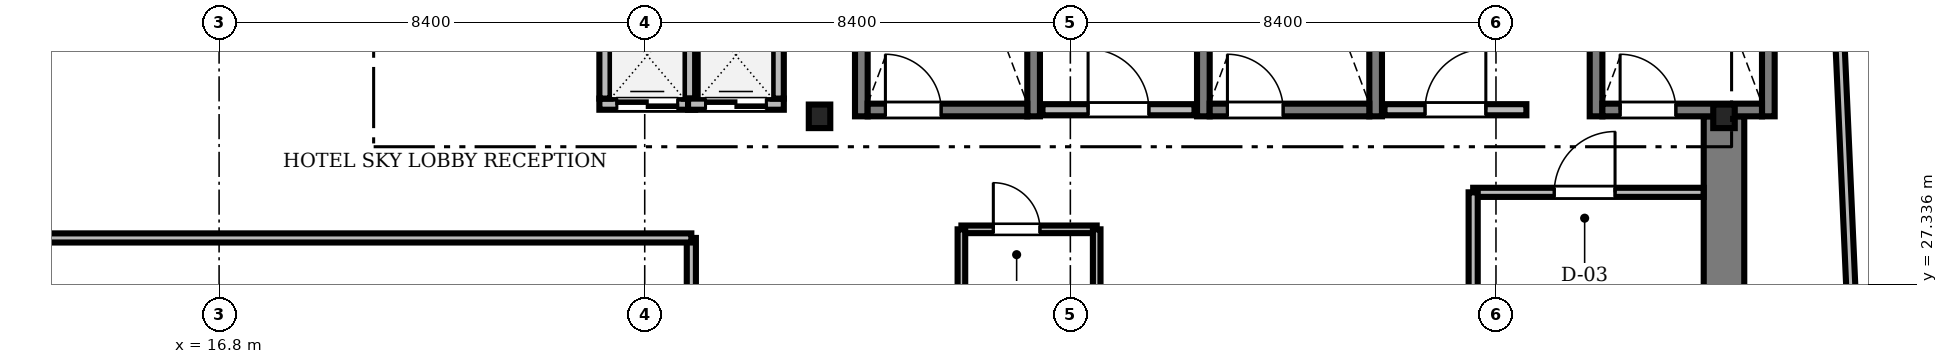
"""IFC4 building model, lengths in metres.
Left out: names, types, materials, properties, quantities, classifications, styles, units other than length and angle.
Written with IfcOpenShell. Run it as: python <this file> out.ifc"""

import sys

from ifc_helpers import new_model, si_unit, direction, frame, frame_2d, origin, origin_2d, place, context, subcontext, project, spatial, rectangle, i_section, extrude, source, transform, mapped, element, fill, save


model = new_model("IFC4")
c1 = context("Model", 3, precision=1e-05, world=origin(), true_north=direction((0.0, 1.0)))
c2 = subcontext(c1, "Body", "Model", "MODEL_VIEW")
j1 = project(units=[si_unit("LENGTHUNIT", "METRE"), si_unit("PLANEANGLEUNIT", "RADIAN")], contexts=[c1])
p1 = place(None, origin())
s1 = spatial("IfcSite", under=j1, at=p1, CompositionType="ELEMENT")
p2 = place(p1, origin())
s2 = spatial("IfcBuilding", under=s1, at=p2, CompositionType="ELEMENT")
p3 = place(p2, frame((0.0, 0.0, 98.7)))
s3 = spatial("IfcBuildingStorey", under=s2, at=p3, CompositionType="ELEMENT", Elevation=98.7)
m1 = source(origin(), c2, "Body", "SweptSolid", [
    extrude(rectangle(XDim=13.15, YDim=0.8, at=frame_2d((6.575, 0.0))), origin(), (0.0, 0.0, 1.0), 4.76),
])
p4 = place(p3, frame((46.5, 17.5, 0.0), z_axis=(0.0, 0.0, 1.0), x_axis=(0.0, 1.0, 0.0)))
e1 = element("IfcWall", 1, at=p4, inside=s3, PredefinedType="SHEAR", context=c2, shape_type="MappedRepresentation", body=[
    mapped(m1, transform((0.0, 0.0, 0.0), scale=1.0)),
])
m2 = source(origin(), c2, "Body", "SweptSolid", [
    extrude(i_section(OverallWidth=0.424, OverallDepth=0.465, WebThickness=0.035, FlangeThickness=0.056, FilletRadius=0.015, at=origin_2d()), origin(), (0.0, 0.0, 1.0), 4.76),
])
for number, where, z_axis, x_axis in (
    (2, (28.65, 30.65, 0.0), (0.0, 0.0, 1.0), (1.0, 0.0, 0.0)),
    (3, (46.5, 30.65, 0.0), (0.0, 0.0, 1.0), (1.0, 0.0, 0.0)),
):
    element("IfcColumn", number, at=place(p3, frame(where, z_axis=z_axis, x_axis=x_axis)), inside=s3, PredefinedType="COLUMN", context=c2, shape_type="MappedRepresentation", body=[
        mapped(m2, transform((0.0, 0.0, 0.0), scale=1.0)),
    ])
m3 = source(origin(), c2, "Body", "SweptSolid", [
    extrude(rectangle(XDim=9.25, YDim=0.25, at=frame_2d((4.625, 0.0))), origin(), (0.0, 0.0, 1.0), 4.8),
])
for number, where, z_axis, x_axis in (
    (4, (29.475, 30.65, 0.0), (0.0, 0.0, 1.0), (0.0, 1.0, 0.0)),
    (5, (32.875, 30.65, 0.0), (0.0, 0.0, 1.0), (0.0, 1.0, 0.0)),
):
    element("IfcWall", number, at=place(p3, frame(where, z_axis=z_axis, x_axis=x_axis)), inside=s3, PredefinedType="SOLIDWALL", context=c2, shape_type="MappedRepresentation", body=[
        mapped(m3, transform((0.0, 0.0, 0.0), scale=1.0)),
    ])
m4 = source(origin(), c2, "Body", "SweptSolid", [
    extrude(rectangle(XDim=3.15, YDim=0.25, at=frame_2d((1.575, 0.0))), origin(), (0.0, 0.0, 1.0), 4.8),
])
p5 = place(p3, frame((29.6, 30.775, 0.0), z_axis=(0.0, 0.0, 1.0), x_axis=(1.0, 0.0, 0.0)))
e6 = element("IfcWall", 6, at=p5, inside=s3, PredefinedType="SOLIDWALL", context=c2, shape_type="MappedRepresentation", body=[
    mapped(m4, transform((0.0, 0.0, 0.0), scale=1.0)),
])
m5 = source(origin(), c2, "Body", "SweptSolid", [
    extrude(rectangle(XDim=1.1, YDim=2.2, at=frame_2d((0.55, 1.1))), frame((0.0, 0.135, 0.0), z_axis=(0.0, -1.0, 0.0), x_axis=(1.0, 0.0, 0.0)), (0.0, 0.0, 1.0), 0.27),
])
p6 = place(p5, frame((0.35, 0.0, 0.0)))
e7 = element("IfcOpeningElement", 7, at=p6, cuts=e6, PredefinedType="OPENING", context=c2, shape_type="MappedRepresentation", body=[
    mapped(m5, transform((0.0, 0.0, 0.0), scale=1.0)),
])
for number, where, z_axis, x_axis in (
    (8, (36.225, 30.65, 0.0), (0.0, 0.0, 1.0), (0.0, 1.0, 0.0)),
    (9, (39.625, 30.65, 0.0), (0.0, 0.0, 1.0), (0.0, 1.0, 0.0)),
):
    element("IfcWall", number, at=place(p3, frame(where, z_axis=z_axis, x_axis=x_axis)), inside=s3, PredefinedType="SOLIDWALL", context=c2, shape_type="MappedRepresentation", body=[
        mapped(m3, transform((0.0, 0.0, 0.0), scale=1.0)),
    ])
p7 = place(p3, frame((36.35, 30.775, 0.0), z_axis=(0.0, 0.0, 1.0), x_axis=(1.0, 0.0, 0.0)))
e10 = element("IfcWall", 10, at=p7, inside=s3, PredefinedType="SOLIDWALL", context=c2, shape_type="MappedRepresentation", body=[
    mapped(m4, transform((0.0, 0.0, 0.0), scale=1.0)),
])
p8 = place(p7, frame((0.35, 0.0, 0.0)))
e11 = element("IfcOpeningElement", 11, at=p8, cuts=e10, PredefinedType="OPENING", context=c2, shape_type="MappedRepresentation", body=[
    mapped(m5, transform((0.0, 0.0, 0.0), scale=1.0)),
])
for number, where, z_axis, x_axis in (
    (12, (43.975, 30.65, 0.0), (0.0, 0.0, 1.0), (0.0, 1.0, 0.0)),
    (13, (47.375, 30.65, 0.0), (0.0, 0.0, 1.0), (0.0, 1.0, 0.0)),
):
    element("IfcWall", number, at=place(p3, frame(where, z_axis=z_axis, x_axis=x_axis)), inside=s3, PredefinedType="SOLIDWALL", context=c2, shape_type="MappedRepresentation", body=[
        mapped(m3, transform((0.0, 0.0, 0.0), scale=1.0)),
    ])
p9 = place(p3, frame((44.1, 30.775, 0.0), z_axis=(0.0, 0.0, 1.0), x_axis=(1.0, 0.0, 0.0)))
e14 = element("IfcWall", 14, at=p9, inside=s3, PredefinedType="SOLIDWALL", context=c2, shape_type="MappedRepresentation", body=[
    mapped(m4, transform((0.0, 0.0, 0.0), scale=1.0)),
])
p10 = place(p9, frame((0.35, 0.0, 0.0)))
e15 = element("IfcOpeningElement", 15, at=p10, cuts=e14, PredefinedType="OPENING", context=c2, shape_type="MappedRepresentation", body=[
    mapped(m5, transform((0.0, 0.0, 0.0), scale=1.0)),
])
m6 = source(origin(), c2, "Body", "SweptSolid", [
    extrude(rectangle(XDim=3.0, YDim=0.22, at=frame_2d((1.5, 0.0))), origin(), (0.0, 0.0, 1.0), 4.76),
])
p11 = place(p3, frame((33.05, 30.78, 0.0), z_axis=(0.0, 0.0, 1.0), x_axis=(1.0, 0.0, 0.0)))
e16 = element("IfcWall", 16, at=p11, inside=s3, PredefinedType="SOLIDWALL", context=c2, shape_type="MappedRepresentation", body=[
    mapped(m6, transform((0.0, 0.0, 0.0), scale=1.0)),
])
m7 = source(origin(), c2, "Body", "SweptSolid", [
    extrude(rectangle(XDim=1.2, YDim=2.2, at=frame_2d((0.6, 1.1))), frame((0.0, 0.12, 0.0), z_axis=(0.0, -1.0, 0.0), x_axis=(1.0, 0.0, 0.0)), (0.0, 0.0, 1.0), 0.24),
])
p12 = place(p11, frame((0.9, 0.0, 0.0)))
e17 = element("IfcOpeningElement", 17, at=p12, cuts=e16, PredefinedType="OPENING", context=c2, shape_type="MappedRepresentation", body=[
    mapped(m7, transform((0.0, 0.0, 0.0), scale=1.0)),
])
m8 = source(origin(), c2, "Body", "SweptSolid", [
    extrude(rectangle(XDim=2.8, YDim=0.22, at=frame_2d((1.4, 0.0))), origin(), (0.0, 0.0, 1.0), 4.76),
])
p13 = place(p3, frame((39.8, 30.78, 0.0), z_axis=(0.0, 0.0, 1.0), x_axis=(1.0, 0.0, 0.0)))
e18 = element("IfcWall", 18, at=p13, inside=s3, PredefinedType="SOLIDWALL", context=c2, shape_type="MappedRepresentation", body=[
    mapped(m8, transform((0.0, 0.0, 0.0), scale=1.0)),
])
p14 = place(p13, frame((0.8, 0.0, 0.0)))
e19 = element("IfcOpeningElement", 19, at=p14, cuts=e18, PredefinedType="OPENING", context=c2, shape_type="MappedRepresentation", body=[
    mapped(m7, transform((0.0, 0.0, 0.0), scale=1.0)),
])
m9 = source(origin(), c2, "Body", "SweptSolid", [
    extrude(rectangle(XDim=1.89, YDim=0.22, at=frame_2d((0.945, 0.0))), origin(), (0.0, 0.0, 1.0), 4.76),
])
p15 = place(p3, frame((24.305, 30.89, 0.0), z_axis=(0.0, 0.0, 1.0), x_axis=(1.0, 0.0, 0.0)))
e20 = element("IfcWall", 20, at=p15, inside=s3, PredefinedType="SOLIDWALL", context=c2, shape_type="MappedRepresentation", body=[
    mapped(m9, transform((0.0, 0.0, 0.0), scale=1.0)),
])
m10 = source(origin(), c2, "Body", "SweptSolid", [
    extrude(rectangle(XDim=1.2, YDim=2.25, at=frame_2d((0.6, 1.125))), frame((0.0, 0.12, 0.0), z_axis=(0.0, -1.0, 0.0), x_axis=(1.0, 0.0, 0.0)), (0.0, 0.0, 1.0), 0.24),
])
p16 = place(p15, frame((0.345, 0.0, 0.0)))
e21 = element("IfcOpeningElement", 21, at=p16, cuts=e20, PredefinedType="OPENING", context=c2, shape_type="MappedRepresentation", body=[
    mapped(m10, transform((0.0, 0.0, 0.0), scale=1.0)),
])
m11 = source(origin(), c2, "Body", "SweptSolid", [
    extrude(rectangle(XDim=1.7, YDim=0.22, at=frame_2d((0.85, 0.0))), origin(), (0.0, 0.0, 1.0), 4.76),
])
for number, where, z_axis, x_axis in (
    (22, (24.415, 31.0, 0.0), (0.0, 0.0, 1.0), (0.0, 1.0, 0.0)),
    (23, (26.085, 31.0, 0.0), (0.0, 0.0, 1.0), (0.0, 1.0, 0.0)),
):
    element("IfcWall", number, at=place(p3, frame(where, z_axis=z_axis, x_axis=x_axis)), inside=s3, PredefinedType="SOLIDWALL", context=c2, shape_type="MappedRepresentation", body=[
        mapped(m11, transform((0.0, 0.0, 0.0), scale=1.0)),
    ])
p17 = place(p3, frame((26.055, 30.89, 0.0), z_axis=(0.0, 0.0, 1.0), x_axis=(1.0, 0.0, 0.0)))
e24 = element("IfcWall", 24, at=p17, inside=s3, PredefinedType="SOLIDWALL", context=c2, shape_type="MappedRepresentation", body=[
    mapped(m9, transform((0.0, 0.0, 0.0), scale=1.0)),
])
p18 = place(p17, frame((0.345, 0.0, 0.0)))
e25 = element("IfcOpeningElement", 25, at=p18, cuts=e24, PredefinedType="OPENING", context=c2, shape_type="MappedRepresentation", body=[
    mapped(m10, transform((0.0, 0.0, 0.0), scale=1.0)),
])
p19 = place(p3, frame((27.835, 31.0, 0.0), z_axis=(0.0, 0.0, 1.0), x_axis=(0.0, 1.0, 0.0)))
e26 = element("IfcWall", 26, at=p19, inside=s3, PredefinedType="SOLIDWALL", context=c2, shape_type="MappedRepresentation", body=[
    mapped(m11, transform((0.0, 0.0, 0.0), scale=1.0)),
])
m12 = source(origin(), c2, "Body", "SweptSolid", [
    extrude(rectangle(XDim=27.106, YDim=0.18, at=frame_2d((13.553, 0.0))), origin(), (0.0, 0.0, 1.0), 4.152),
])
p20 = place(p3, frame((49.6, 13.8, 0.0), z_axis=(0.0, 0.0, 1.0), x_axis=(-0.044277164483, 0.999019285452, 0.0)))
e27 = element("IfcWall", 27, at=p20, inside=s3, PredefinedType="PARTITIONING", context=c2, shape_type="MappedRepresentation", body=[
    mapped(m12, transform((0.0, 0.0, 0.0), scale=1.0)),
])
m13 = source(origin(), c2, "Body", "SweptSolid", [
    extrude(rectangle(XDim=1.8, YDim=2.4, at=frame_2d((0.9, 1.2))), frame((0.0, 0.1, 0.0), z_axis=(0.0, -1.0, 0.0), x_axis=(1.0, 0.0, 0.0)), (0.0, 0.0, 1.0), 0.2),
])
p21 = place(p20, frame((2.4, 0.0, 0.0)))
e28 = element("IfcOpeningElement", 28, at=p21, cuts=e27, PredefinedType="OPENING", context=c2, shape_type="MappedRepresentation", body=[
    mapped(m13, transform((0.0, 0.0, 0.0), scale=1.0)),
])
m14 = source(origin(), c2, "Body", "SweptSolid", [
    extrude(rectangle(XDim=1.05, YDim=2.2, at=frame_2d((0.525, 1.1))), frame((0.0, 0.1, 0.0), z_axis=(0.0, -1.0, 0.0), x_axis=(1.0, 0.0, 0.0)), (0.0, 0.0, 1.0), 0.2),
])
p22 = place(p20, frame((19.2, 0.0, 0.0)))
e29 = element("IfcOpeningElement", 29, at=p22, cuts=e27, PredefinedType="OPENING", context=c2, shape_type="MappedRepresentation", body=[
    mapped(m14, transform((0.0, 0.0, 0.0), scale=1.0)),
])
m15 = source(origin(), c2, "Body", "SweptSolid", [
    extrude(rectangle(XDim=14.45, YDim=0.18, at=frame_2d((7.225, 0.0))), origin(), (0.0, 0.0, 1.0), 4.152),
])
p23 = place(p3, frame((26.12, 13.8, 0.0), z_axis=(0.0, 0.0, 1.0), x_axis=(0.0, 1.0, 0.0)))
e30 = element("IfcWall", 30, at=p23, inside=s3, PredefinedType="PARTITIONING", context=c2, shape_type="MappedRepresentation", body=[
    mapped(m15, transform((0.0, 0.0, 0.0), scale=1.0)),
])
p24 = place(p23, frame((4.2, 0.0, 0.0)))
e31 = element("IfcOpeningElement", 31, at=p24, cuts=e30, PredefinedType="OPENING", context=c2, shape_type="MappedRepresentation", body=[
    mapped(m14, transform((0.0, 0.0, 0.0), scale=1.0)),
])
m16 = source(origin(), c2, "Body", "SweptSolid", [
    extrude(rectangle(XDim=4.548, YDim=0.18, at=frame_2d((2.274, 0.0))), origin(), (0.0, 0.0, 1.0), 4.392),
])
p25 = place(p3, frame((41.55, 29.15, 0.0), z_axis=(0.0, 0.0, 1.0), x_axis=(1.0, 0.0, 0.0)))
e32 = element("IfcWall", 32, at=p25, inside=s3, PredefinedType="PARTITIONING", context=c2, shape_type="MappedRepresentation", body=[
    mapped(m16, transform((0.0, 0.0, 0.0), scale=1.0)),
])
m17 = source(origin(), c2, "Body", "SweptSolid", [
    extrude(rectangle(XDim=1.2, YDim=2.2, at=frame_2d((0.6, 1.1))), frame((0.0, 0.1, 0.0), z_axis=(0.0, -1.0, 0.0), x_axis=(1.0, 0.0, 0.0)), (0.0, 0.0, 1.0), 0.2),
])
p26 = place(p25, frame((1.6, 0.0, 0.0)))
e33 = element("IfcOpeningElement", 33, at=p26, cuts=e32, PredefinedType="OPENING", context=c2, shape_type="MappedRepresentation", body=[
    mapped(m17, transform((0.0, 0.0, 0.0), scale=1.0)),
])
m18 = source(origin(), c2, "Body", "SweptSolid", [
    extrude(rectangle(XDim=2.67, YDim=0.15, at=frame_2d((1.335, 0.0))), origin(), (0.0, 0.0, 1.0), 4.392),
])
p27 = place(p3, frame((31.45, 28.42, 0.0), z_axis=(0.0, 0.0, 1.0), x_axis=(1.0, 0.0, 0.0)))
e34 = element("IfcWall", 34, at=p27, inside=s3, PredefinedType="PARTITIONING", context=c2, shape_type="MappedRepresentation", body=[
    mapped(m18, transform((0.0, 0.0, 0.0), scale=1.0)),
])
m19 = source(origin(), c2, "Body", "SweptSolid", [
    extrude(rectangle(XDim=0.92, YDim=2.1, at=frame_2d((0.46, 1.05))), frame((0.0, 0.085, 0.0), z_axis=(0.0, -1.0, 0.0), x_axis=(1.0, 0.0, 0.0)), (0.0, 0.0, 1.0), 0.17),
])
p28 = place(p27, frame((0.63, 0.0, 0.0)))
e35 = element("IfcOpeningElement", 35, at=p28, cuts=e34, PredefinedType="OPENING", context=c2, shape_type="MappedRepresentation", body=[
    mapped(m19, transform((0.0, 0.0, 0.0), scale=1.0)),
])
m20 = source(origin(), c2, "Body", "SweptSolid", [
    extrude(rectangle(XDim=19.4, YDim=0.18, at=frame_2d((9.7, 0.0))), origin(), (0.0, 0.0, 1.0), 4.002),
])
p29 = place(p3, frame((6.72, 28.25, 0.0), z_axis=(0.0, 0.0, 1.0), x_axis=(1.0, 0.0, 0.0)))
e36 = element("IfcWall", 36, at=p29, inside=s3, PredefinedType="PARTITIONING", context=c2, shape_type="MappedRepresentation", body=[
    mapped(m20, transform((0.0, 0.0, 0.0), scale=1.0)),
])
m21 = source(origin(), c2, "Body", "SweptSolid", [
    extrude(rectangle(XDim=2.35, YDim=0.18, at=frame_2d((1.175, 0.0))), origin(), (0.0, 0.0, 1.0), 4.152),
])
p30 = place(p3, frame((41.55, 26.8, 0.0), z_axis=(0.0, 0.0, 1.0), x_axis=(0.0, 1.0, 0.0)))
e37 = element("IfcWall", 37, at=p30, inside=s3, PredefinedType="PARTITIONING", context=c2, shape_type="MappedRepresentation", body=[
    mapped(m21, transform((0.0, 0.0, 0.0), scale=1.0)),
])
m22 = source(origin(), c2, "Body", "SweptSolid", [
    extrude(rectangle(XDim=1.6, YDim=0.15, at=frame_2d((0.8, 0.0))), origin(), (0.0, 0.0, 1.0), 4.302),
])
for number, where, z_axis, x_axis in (
    (38, (31.45, 26.82, 0.0), (0.0, 0.0, 1.0), (0.0, 1.0, 0.0)),
    (39, (34.12, 26.82, 0.0), (0.0, 0.0, 1.0), (0.0, 1.0, 0.0)),
):
    element("IfcWall", number, at=place(p3, frame(where, z_axis=z_axis, x_axis=x_axis)), inside=s3, PredefinedType="PARTITIONING", context=c2, shape_type="MappedRepresentation", body=[
        mapped(m22, transform((0.0, 0.0, 0.0), scale=1.0)),
    ])
m23 = source(origin(), c2, "Body", "SweptSolid", [
    extrude(rectangle(XDim=1.1, YDim=2.2, at=frame_2d((0.55, 1.1))), frame((0.0, 0.025, 0.0), z_axis=(0.0, -1.0, 0.0), x_axis=(1.0, 0.0, 0.0)), (0.0, 0.0, 1.0), 0.05),
])
p31 = place(p6, origin())
e40 = element("IfcDoor", 40, at=p31, inside=s3, OperationType="SINGLE_SWING_LEFT", PredefinedType="DOOR", context=c2, shape_type="MappedRepresentation", body=[
    mapped(m23, transform((0.0, 0.0, 0.0), scale=1.0)),
])
fill(e7, e40)
p32 = place(p8, origin())
e41 = element("IfcDoor", 41, at=p32, inside=s3, OperationType="SINGLE_SWING_LEFT", PredefinedType="DOOR", context=c2, shape_type="MappedRepresentation", body=[
    mapped(m23, transform((0.0, 0.0, 0.0), scale=1.0)),
])
fill(e11, e41)
p33 = place(p10, origin())
e42 = element("IfcDoor", 42, at=p33, inside=s3, OperationType="SINGLE_SWING_LEFT", PredefinedType="DOOR", context=c2, shape_type="MappedRepresentation", body=[
    mapped(m23, transform((0.0, 0.0, 0.0), scale=1.0)),
])
fill(e15, e42)
m24 = source(origin(), c2, "Body", "SweptSolid", [
    extrude(rectangle(XDim=1.2, YDim=2.2, at=frame_2d((0.6, 1.1))), frame((0.0, 0.025, 0.0), z_axis=(0.0, -1.0, 0.0), x_axis=(1.0, 0.0, 0.0)), (0.0, 0.0, 1.0), 0.05),
])
p34 = place(p12, origin())
e43 = element("IfcDoor", 43, at=p34, inside=s3, OperationType="SINGLE_SWING_LEFT", PredefinedType="DOOR", context=c2, shape_type="MappedRepresentation", body=[
    mapped(m24, transform((0.0, 0.0, 0.0), scale=1.0)),
])
fill(e17, e43)
p35 = place(p14, origin())
e44 = element("IfcDoor", 44, at=p35, inside=s3, OperationType="SINGLE_SWING_RIGHT", PredefinedType="DOOR", context=c2, shape_type="MappedRepresentation", body=[
    mapped(m24, transform((0.0, 0.0, 0.0), scale=1.0)),
])
fill(e19, e44)
m25 = source(origin(), c2, "Body", "SweptSolid", [
    extrude(rectangle(XDim=1.2, YDim=2.25, at=frame_2d((0.6, 1.125))), frame((0.0, 0.025, 0.0), z_axis=(0.0, -1.0, 0.0), x_axis=(1.0, 0.0, 0.0)), (0.0, 0.0, 1.0), 0.05),
])
p36 = place(p16, origin())
e45 = element("IfcDoor", 45, at=p36, inside=s3, OperationType="DOUBLE_DOOR_SLIDING", PredefinedType="DOOR", context=c2, shape_type="MappedRepresentation", body=[
    mapped(m25, transform((0.0, 0.0, 0.0), scale=1.0)),
])
fill(e21, e45)
p37 = place(p18, origin())
e46 = element("IfcDoor", 46, at=p37, inside=s3, OperationType="DOUBLE_DOOR_SLIDING", PredefinedType="DOOR", context=c2, shape_type="MappedRepresentation", body=[
    mapped(m25, transform((0.0, 0.0, 0.0), scale=1.0)),
])
fill(e25, e46)
p38 = place(p26, origin())
e47 = element("IfcDoor", 47, at=p38, inside=s3, OperationType="SINGLE_SWING_RIGHT", PredefinedType="DOOR", context=c2, shape_type="MappedRepresentation", body=[
    mapped(m24, transform((0.0, 0.0, 0.0), scale=1.0)),
])
fill(e33, e47)
m26 = source(origin(), c2, "Body", "SweptSolid", [
    extrude(rectangle(XDim=0.92, YDim=2.1, at=frame_2d((0.46, 1.05))), frame((0.0, 0.025, 0.0), z_axis=(0.0, -1.0, 0.0), x_axis=(1.0, 0.0, 0.0)), (0.0, 0.0, 1.0), 0.05),
])
p39 = place(p28, origin())
e48 = element("IfcDoor", 48, at=p39, inside=s3, OperationType="SINGLE_SWING_LEFT", PredefinedType="DOOR", context=c2, shape_type="MappedRepresentation", body=[
    mapped(m26, transform((0.0, 0.0, 0.0), scale=1.0)),
])
fill(e35, e48)
save(model, sys.argv[1])
